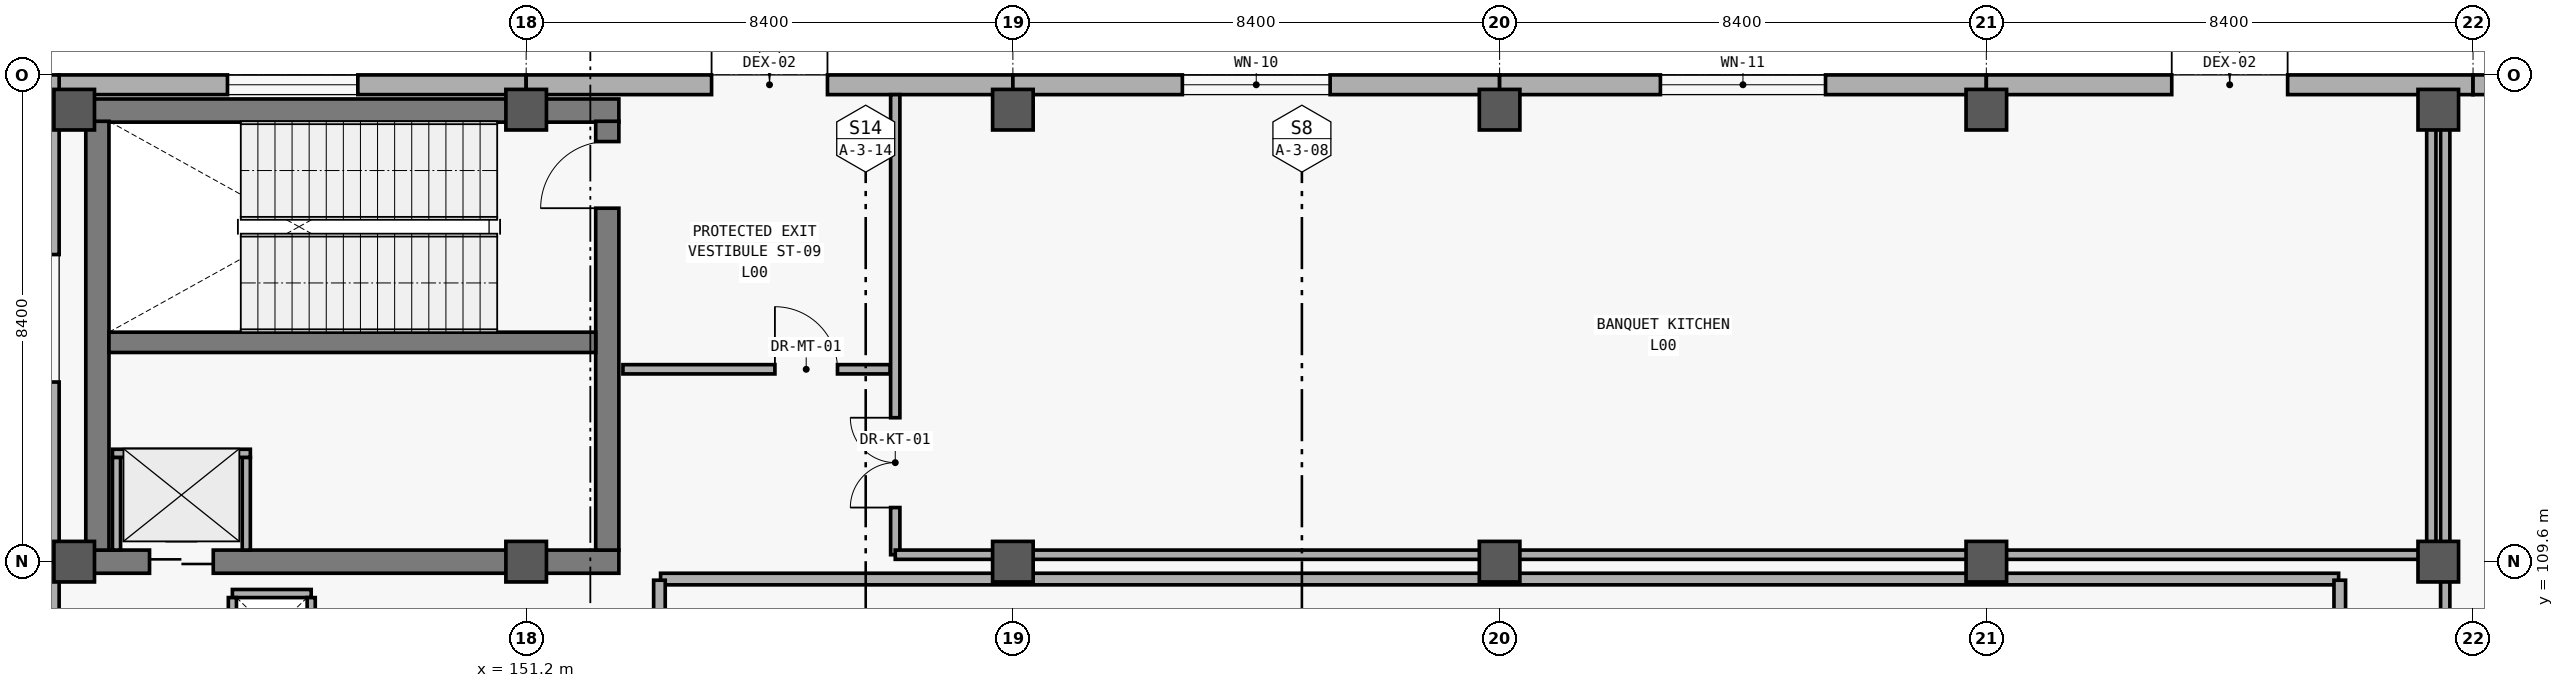
"""IFC4 building model, lengths in metres.
Left out: names, types, materials, properties, quantities, classifications, styles, units other than length and angle.
Written with IfcOpenShell. Run it as: python <this file> out.ifc"""

import sys

from ifc_helpers import new_model, si_unit, direction, frame, frame_2d, origin, origin_2d, place, context, subcontext, project, spatial, rectangle, extrude, element, fill, save


model = new_model("IFC4")
c1 = context("Model", 3, precision=1e-05, world=origin(), true_north=direction((0.0, 1.0)))
c2 = subcontext(c1, "Body", "Model", "MODEL_VIEW")
j1 = project(units=[si_unit("LENGTHUNIT", "METRE"), si_unit("PLANEANGLEUNIT", "RADIAN")], contexts=[c1])
p1 = place(None, origin())
s1 = spatial("IfcSite", under=j1, at=p1, CompositionType="ELEMENT")
p2 = place(p1, origin())
s2 = spatial("IfcBuilding", under=s1, at=p2, CompositionType="ELEMENT")
p3 = place(p2, origin())
s3 = spatial("IfcBuildingStorey", under=s2, at=p3, CompositionType="ELEMENT", Elevation=0.0)
for number, where, z_axis, x_axis in (
    (1, (143.4, 109.6, 0.0), (0.0, 0.0, 1.0), (1.0, 0.0, 0.0)),
    (2, (143.4, 117.4, 0.0), (0.0, 0.0, 1.0), (1.0, 0.0, 0.0)),
    (3, (151.2, 109.6, 0.0), (0.0, 0.0, 1.0), (1.0, 0.0, 0.0)),
    (4, (151.2, 117.4, 0.0), (0.0, 0.0, 1.0), (1.0, 0.0, 0.0)),
    (5, (159.6, 109.6, 0.0), (0.0, 0.0, 1.0), (1.0, 0.0, 0.0)),
    (6, (159.6, 117.4, 0.0), (0.0, 0.0, 1.0), (1.0, 0.0, 0.0)),
    (7, (168.0, 109.6, 0.0), (0.0, 0.0, 1.0), (1.0, 0.0, 0.0)),
    (8, (168.0, 117.4, 0.0), (0.0, 0.0, 1.0), (1.0, 0.0, 0.0)),
    (9, (176.4, 109.6, 0.0), (0.0, 0.0, 1.0), (1.0, 0.0, 0.0)),
    (10, (176.4, 117.4, 0.0), (0.0, 0.0, 1.0), (1.0, 0.0, 0.0)),
    (11, (184.2, 109.6, 0.0), (0.0, 0.0, 1.0), (1.0, 0.0, 0.0)),
    (12, (184.2, 117.4, 0.0), (0.0, 0.0, 1.0), (1.0, 0.0, 0.0)),
):
    element("IfcColumn", number, at=place(p3, frame(where, z_axis=z_axis, x_axis=x_axis)), inside=s3, PredefinedType="COLUMN", context=c2, shape_type="SweptSolid", body=[
        extrude(rectangle(XDim=0.7, YDim=0.7, at=origin_2d()), origin(), (0.0, 0.0, 1.0), 5.4),
    ])
p4 = place(p3, frame((143.14, 117.83, 0.0), z_axis=(0.0, 0.0, 1.0), x_axis=(1.0, 0.0, 0.0)))
e13 = element("IfcWall", 13, at=p4, inside=s3, PredefinedType="SOLIDWALL", context=c2, shape_type="SweptSolid", body=[
    extrude(rectangle(XDim=8.06, YDim=0.34, at=frame_2d((4.03, 0.0))), origin(), (0.0, 0.0, 1.0), 5.08),
])
p5 = place(p4, frame((2.905, 0.0, 0.9)))
e14 = element("IfcOpeningElement", 14, at=p5, cuts=e13, PredefinedType="OPENING", context=c2, shape_type="SweptSolid", body=[
    extrude(rectangle(XDim=2.25, YDim=1.75, at=frame_2d((1.125, 0.875))), frame((0.0, 0.18, 0.0), z_axis=(0.0, -1.0, 0.0), x_axis=(1.0, 0.0, 0.0)), (0.0, 0.0, 1.0), 0.36),
])
p6 = place(p3, frame((151.2, 117.83, 0.0), z_axis=(0.0, 0.0, 1.0), x_axis=(1.0, 0.0, 0.0)))
e15 = element("IfcWall", 15, at=p6, inside=s3, PredefinedType="SOLIDWALL", context=c2, shape_type="SweptSolid", body=[
    extrude(rectangle(XDim=8.4, YDim=0.34, at=frame_2d((4.2, 0.0))), origin(), (0.0, 0.0, 1.0), 5.08),
])
p7 = place(p6, frame((3.2, 0.0, 0.0)))
e16 = element("IfcOpeningElement", 16, at=p7, cuts=e15, PredefinedType="OPENING", context=c2, shape_type="SweptSolid", body=[
    extrude(rectangle(XDim=2.0, YDim=2.6, at=frame_2d((1.0, 1.3))), frame((0.0, 0.18, 0.0), z_axis=(0.0, -1.0, 0.0), x_axis=(1.0, 0.0, 0.0)), (0.0, 0.0, 1.0), 0.36),
])
p8 = place(p3, frame((159.6, 117.83, 0.0), z_axis=(0.0, 0.0, 1.0), x_axis=(1.0, 0.0, 0.0)))
e17 = element("IfcWall", 17, at=p8, inside=s3, PredefinedType="SOLIDWALL", context=c2, shape_type="SweptSolid", body=[
    extrude(rectangle(XDim=8.4, YDim=0.34, at=frame_2d((4.2, 0.0))), origin(), (0.0, 0.0, 1.0), 5.08),
])
p9 = place(p8, frame((2.925, 0.0, 0.9)))
e18 = element("IfcOpeningElement", 18, at=p9, cuts=e17, PredefinedType="OPENING", context=c2, shape_type="SweptSolid", body=[
    extrude(rectangle(XDim=2.55, YDim=1.8, at=frame_2d((1.275, 0.9))), frame((0.0, 0.18, 0.0), z_axis=(0.0, -1.0, 0.0), x_axis=(1.0, 0.0, 0.0)), (0.0, 0.0, 1.0), 0.36),
])
p10 = place(p3, frame((168.0, 117.83, 0.0), z_axis=(0.0, 0.0, 1.0), x_axis=(1.0, 0.0, 0.0)))
e19 = element("IfcWall", 19, at=p10, inside=s3, PredefinedType="SOLIDWALL", context=c2, shape_type="SweptSolid", body=[
    extrude(rectangle(XDim=8.4, YDim=0.34, at=frame_2d((4.2, 0.0))), origin(), (0.0, 0.0, 1.0), 5.08),
])
p11 = place(p10, frame((2.775, 0.0, 0.9)))
e20 = element("IfcOpeningElement", 20, at=p11, cuts=e19, PredefinedType="OPENING", context=c2, shape_type="SweptSolid", body=[
    extrude(rectangle(XDim=2.85, YDim=1.85, at=frame_2d((1.425, 0.925))), frame((0.0, 0.18, 0.0), z_axis=(0.0, -1.0, 0.0), x_axis=(1.0, 0.0, 0.0)), (0.0, 0.0, 1.0), 0.36),
])
p12 = place(p3, frame((176.4, 117.83, 0.0), z_axis=(0.0, 0.0, 1.0), x_axis=(1.0, 0.0, 0.0)))
e21 = element("IfcWall", 21, at=p12, inside=s3, PredefinedType="SOLIDWALL", context=c2, shape_type="SweptSolid", body=[
    extrude(rectangle(XDim=8.4, YDim=0.34, at=frame_2d((4.2, 0.0))), origin(), (0.0, 0.0, 1.0), 5.08),
])
p13 = place(p12, frame((3.2, 0.0, 0.0)))
e22 = element("IfcOpeningElement", 22, at=p13, cuts=e21, PredefinedType="OPENING", context=c2, shape_type="SweptSolid", body=[
    extrude(rectangle(XDim=2.0, YDim=2.6, at=frame_2d((1.0, 1.3))), frame((0.0, 0.18, 0.0), z_axis=(0.0, -1.0, 0.0), x_axis=(1.0, 0.0, 0.0)), (0.0, 0.0, 1.0), 0.36),
])
p14 = place(p3, frame((184.8, 117.83, 0.0), z_axis=(0.0, 0.0, 1.0), x_axis=(1.0, 0.0, 0.0)))
e23 = element("IfcWall", 23, at=p14, inside=s3, PredefinedType="SOLIDWALL", context=c2, shape_type="SweptSolid", body=[
    extrude(rectangle(XDim=8.06, YDim=0.34, at=frame_2d((4.03, 0.0))), origin(), (0.0, 0.0, 1.0), 5.08),
])
p15 = place(p14, frame((2.28, 0.0, 0.9)))
e24 = element("IfcOpeningElement", 24, at=p15, cuts=e23, PredefinedType="OPENING", context=c2, shape_type="SweptSolid", body=[
    extrude(rectangle(XDim=3.5, YDim=2.0, at=frame_2d((1.75, 1.0))), frame((0.0, 0.18, 0.0), z_axis=(0.0, -1.0, 0.0), x_axis=(1.0, 0.0, 0.0)), (0.0, 0.0, 1.0), 0.36),
])
p16 = place(p3, frame((142.97, 101.2, 0.0), z_axis=(0.0, 0.0, 1.0), x_axis=(0.0, 1.0, 0.0)))
e25 = element("IfcWall", 25, at=p16, inside=s3, PredefinedType="SOLIDWALL", context=c2, shape_type="SweptSolid", body=[
    extrude(rectangle(XDim=8.4, YDim=0.34, at=frame_2d((4.2, 0.0))), origin(), (0.0, 0.0, 1.0), 5.08),
])
p17 = place(p16, frame((3.3, 0.0, 0.0)))
e26 = element("IfcOpeningElement", 26, at=p17, cuts=e25, PredefinedType="OPENING", context=c2, shape_type="SweptSolid", body=[
    extrude(rectangle(XDim=1.8, YDim=2.4, at=frame_2d((0.9, 1.2))), frame((0.0, 0.18, 0.0), z_axis=(0.0, -1.0, 0.0), x_axis=(1.0, 0.0, 0.0)), (0.0, 0.0, 1.0), 0.36),
])
p18 = place(p3, frame((142.97, 109.6, 0.0), z_axis=(0.0, 0.0, 1.0), x_axis=(0.0, 1.0, 0.0)))
e27 = element("IfcWall", 27, at=p18, inside=s3, PredefinedType="SOLIDWALL", context=c2, shape_type="SweptSolid", body=[
    extrude(rectangle(XDim=8.4, YDim=0.34, at=frame_2d((4.2, 0.0))), origin(), (0.0, 0.0, 1.0), 5.08),
])
p19 = place(p18, frame((3.1, 0.0, 0.9)))
e28 = element("IfcOpeningElement", 28, at=p19, cuts=e27, PredefinedType="OPENING", context=c2, shape_type="SweptSolid", body=[
    extrude(rectangle(XDim=2.2, YDim=1.65, at=frame_2d((1.1, 0.825))), frame((0.0, 0.18, 0.0), z_axis=(0.0, -1.0, 0.0), x_axis=(1.0, 0.0, 0.0)), (0.0, 0.0, 1.0), 0.36),
])
p20 = place(p3, frame((143.6, 109.6, 0.0), z_axis=(0.0, 0.0, 1.0), x_axis=(1.0, 0.0, 0.0)))
e29 = element("IfcWall", 29, at=p20, inside=s3, PredefinedType="SHEAR", context=c2, shape_type="SweptSolid", body=[
    extrude(rectangle(XDim=9.2, YDim=0.4, at=frame_2d((4.6, 0.0))), origin(), (0.0, 0.0, 1.0), 5.08),
])
p21 = place(p20, frame((1.1, 0.0, 0.0)))
e30 = element("IfcOpeningElement", 30, at=p21, cuts=e29, PredefinedType="OPENING", context=c2, shape_type="SweptSolid", body=[
    extrude(rectangle(XDim=1.1, YDim=2.2, at=frame_2d((0.55, 1.1))), frame((0.0, 0.21, 0.0), z_axis=(0.0, -1.0, 0.0), x_axis=(1.0, 0.0, 0.0)), (0.0, 0.0, 1.0), 0.42),
])
p22 = place(p3, frame((152.8, 117.385, 0.0), z_axis=(0.0, 0.0, 1.0), x_axis=(-1.0, 0.0, 0.0)))
e31 = element("IfcWall", 31, at=p22, inside=s3, PredefinedType="SHEAR", context=c2, shape_type="SweptSolid", body=[
    extrude(rectangle(XDim=9.2, YDim=0.4, at=frame_2d((4.6, 0.0))), origin(), (0.0, 0.0, 1.0), 5.08),
])
p23 = place(p3, frame((143.8, 117.2, 0.0), z_axis=(0.0, 0.0, 1.0), x_axis=(0.0, -1.0, 0.0)))
e32 = element("IfcWall", 32, at=p23, inside=s3, PredefinedType="SHEAR", context=c2, shape_type="SweptSolid", body=[
    extrude(rectangle(XDim=7.4, YDim=0.4, at=frame_2d((3.7, 0.0))), origin(), (0.0, 0.0, 1.0), 5.08),
])
p24 = place(p3, frame((152.6, 109.8, 0.0), z_axis=(0.0, 0.0, 1.0), x_axis=(0.0, 1.0, 0.0)))
e33 = element("IfcWall", 33, at=p24, inside=s3, PredefinedType="SHEAR", context=c2, shape_type="SweptSolid", body=[
    extrude(rectangle(XDim=7.4, YDim=0.4, at=frame_2d((3.7, 0.0))), origin(), (0.0, 0.0, 1.0), 5.08),
])
p25 = place(p24, frame((5.9, 0.0, 0.0)))
e34 = element("IfcOpeningElement", 34, at=p25, cuts=e33, PredefinedType="OPENING", context=c2, shape_type="SweptSolid", body=[
    extrude(rectangle(XDim=1.15, YDim=2.2, at=frame_2d((0.575, 1.1))), frame((0.0, 0.21, 0.0), z_axis=(0.0, -1.0, 0.0), x_axis=(1.0, 0.0, 0.0)), (0.0, 0.0, 1.0), 0.42),
])
p26 = place(p3, frame((144.0, 113.385, 0.0), z_axis=(0.0, 0.0, 1.0), x_axis=(1.0, 0.0, 0.0)))
e35 = element("IfcWall", 35, at=p26, inside=s3, PredefinedType="SHEAR", context=c2, shape_type="SweptSolid", body=[
    extrude(rectangle(XDim=8.4, YDim=0.35, at=frame_2d((4.2, 0.0))), origin(), (0.0, 0.0, 1.0), 5.08),
])
for number, where, z_axis, x_axis in (
    (36, (144.13, 109.8, 0.0), (0.0, 0.0, 1.0), (0.0, 1.0, 0.0)),
    (37, (146.37, 109.8, 0.0), (0.0, 0.0, 1.0), (0.0, 1.0, 0.0)),
):
    element("IfcWall", number, at=place(p3, frame(where, z_axis=z_axis, x_axis=x_axis)), inside=s3, PredefinedType="PARTITIONING", context=c2, shape_type="SweptSolid", body=[
        extrude(rectangle(XDim=1.6, YDim=0.14, at=frame_2d((0.8, 0.0))), origin(), (0.0, 0.0, 1.0), 4.23),
    ])
p27 = place(p3, frame((144.06, 111.47, 0.0), z_axis=(0.0, 0.0, 1.0), x_axis=(1.0, 0.0, 0.0)))
e38 = element("IfcWall", 38, at=p27, inside=s3, PredefinedType="PARTITIONING", context=c2, shape_type="SweptSolid", body=[
    extrude(rectangle(XDim=2.38, YDim=0.14, at=frame_2d((1.19, 0.0))), origin(), (0.0, 0.0, 1.0), 4.23),
])
p28 = place(p3, frame((152.87, 112.92, 0.0), z_axis=(0.0, 0.0, 1.0), x_axis=(1.0, 0.0, 0.0)))
e39 = element("IfcWall", 39, at=p28, inside=s3, PredefinedType="PARTITIONING", context=c2, shape_type="SweptSolid", body=[
    extrude(rectangle(XDim=4.61, YDim=0.16, at=frame_2d((2.305, 0.0))), origin(), (0.0, 0.0, 1.0), 4.18),
])
p29 = place(p28, frame((2.623, 0.0, 0.0)))
e40 = element("IfcOpeningElement", 40, at=p29, cuts=e39, PredefinedType="OPENING", context=c2, shape_type="SweptSolid", body=[
    extrude(rectangle(XDim=1.08, YDim=2.25, at=frame_2d((0.54, 1.125))), frame((0.0, 0.09, 0.0), z_axis=(0.0, -1.0, 0.0), x_axis=(1.0, 0.0, 0.0)), (0.0, 0.0, 1.0), 0.18),
])
p30 = place(p3, frame((157.57, 109.72, 0.0), z_axis=(0.0, 0.0, 1.0), x_axis=(0.0, 1.0, 0.0)))
e41 = element("IfcWall", 41, at=p30, inside=s3, PredefinedType="PARTITIONING", context=c2, shape_type="SweptSolid", body=[
    extrude(rectangle(XDim=7.94, YDim=0.16, at=frame_2d((3.97, 0.0))), origin(), (0.0, 0.0, 1.0), 4.18),
])
p31 = place(p30, frame((0.814, 0.0, 0.0)))
e42 = element("IfcOpeningElement", 42, at=p31, cuts=e41, PredefinedType="OPENING", context=c2, shape_type="SweptSolid", body=[
    extrude(rectangle(XDim=1.55, YDim=2.25, at=frame_2d((0.775, 1.125))), frame((0.0, 0.09, 0.0), z_axis=(0.0, -1.0, 0.0), x_axis=(1.0, 0.0, 0.0)), (0.0, 0.0, 1.0), 0.18),
])
p32 = place(p3, frame((184.32, 92.92, 0.0), z_axis=(0.0, 0.0, 1.0), x_axis=(0.0, 1.0, 0.0)))
e43 = element("IfcWall", 43, at=p32, inside=s3, PredefinedType="PARTITIONING", context=c2, shape_type="SweptSolid", body=[
    extrude(rectangle(XDim=24.74, YDim=0.16, at=frame_2d((12.37, 0.0))), origin(), (0.0, 0.0, 1.0), 4.18),
])
p33 = place(p32, frame((3.487, 0.0, 0.0)))
e44 = element("IfcOpeningElement", 44, at=p33, cuts=e43, PredefinedType="OPENING", context=c2, shape_type="SweptSolid", body=[
    extrude(rectangle(XDim=1.06, YDim=2.2, at=frame_2d((0.53, 1.1))), frame((0.0, 0.09, 0.0), z_axis=(0.0, -1.0, 0.0), x_axis=(1.0, 0.0, 0.0)), (0.0, 0.0, 1.0), 0.18),
])
p34 = place(p3, frame((153.52, 109.3, 0.0), z_axis=(0.0, 0.0, 1.0), x_axis=(1.0, 0.0, 0.0)))
e45 = element("IfcWall", 45, at=p34, inside=s3, PredefinedType="SOLIDWALL", context=c2, shape_type="SweptSolid", body=[
    extrude(rectangle(XDim=28.96, YDim=0.2, at=frame_2d((14.48, 0.0))), origin(), (0.0, 0.0, 1.0), 4.18),
])
for number, where, z_axis, x_axis in (
    (46, (153.5, 92.92, 0.0), (0.0, 0.0, 1.0), (0.0, 1.0, 0.0)),
    (47, (182.5, 92.92, 0.0), (0.0, 0.0, 1.0), (0.0, 1.0, 0.0)),
):
    element("IfcWall", number, at=place(p3, frame(where, z_axis=z_axis, x_axis=x_axis)), inside=s3, PredefinedType="SOLIDWALL", context=c2, shape_type="SweptSolid", body=[
        extrude(rectangle(XDim=16.36, YDim=0.2, at=frame_2d((8.18, 0.0))), origin(), (0.0, 0.0, 1.0), 4.18),
    ])
p35 = place(p3, frame((157.57, 109.72, 0.0), z_axis=(0.0, 0.0, 1.0), x_axis=(1.0, 0.0, 0.0)))
e48 = element("IfcWall", 48, at=p35, inside=s3, PredefinedType="PARTITIONING", context=c2, shape_type="SweptSolid", body=[
    extrude(rectangle(XDim=26.51, YDim=0.16, at=frame_2d((13.255, 0.0))), origin(), (0.0, 0.0, 1.0), 4.18),
])
p36 = place(p3, frame((184.08, 109.72, 0.0), z_axis=(0.0, 0.0, 1.0), x_axis=(0.0, 1.0, 0.0)))
e49 = element("IfcWall", 49, at=p36, inside=s3, PredefinedType="PARTITIONING", context=c2, shape_type="SweptSolid", body=[
    extrude(rectangle(XDim=7.94, YDim=0.16, at=frame_2d((3.97, 0.0))), origin(), (0.0, 0.0, 1.0), 4.18),
])
p37 = place(p3, frame((147.49, 109.05, 0.0), z_axis=(0.0, 0.0, 1.0), x_axis=(-1.0, 0.0, 0.0)))
e50 = element("IfcWall", 50, at=p37, inside=s3, PredefinedType="PARTITIONING", context=c2, shape_type="SweptSolid", body=[
    extrude(rectangle(XDim=1.36, YDim=0.14, at=frame_2d((0.68, 0.0))), origin(), (0.0, 0.0, 1.0), 4.2),
])
for number, where, z_axis, x_axis in (
    (51, (146.13, 108.98, 0.0), (0.0, 0.0, 1.0), (0.0, -1.0, 0.0)),
    (52, (147.49, 107.8, 0.0), (0.0, 0.0, 1.0), (0.0, 1.0, 0.0)),
):
    element("IfcWall", number, at=place(p3, frame(where, z_axis=z_axis, x_axis=x_axis)), inside=s3, PredefinedType="PARTITIONING", context=c2, shape_type="SweptSolid", body=[
        extrude(rectangle(XDim=1.18, YDim=0.14, at=frame_2d((0.59, 0.0))), origin(), (0.0, 0.0, 1.0), 4.2),
    ])
p38 = place(p5, origin())
e53 = element("IfcWindow", 53, at=p38, inside=s3, PartitioningType="SINGLE_PANEL", PredefinedType="WINDOW", context=c2, shape_type="SweptSolid", body=[
    extrude(rectangle(XDim=2.25, YDim=1.75, at=frame_2d((1.125, 0.875))), frame((0.0, 0.03, 0.0), z_axis=(0.0, -1.0, 0.0), x_axis=(1.0, 0.0, 0.0)), (0.0, 0.0, 1.0), 0.06),
])
fill(e14, e53)
p39 = place(p7, origin())
e54 = element("IfcDoor", 54, at=p39, inside=s3, OperationType="DOUBLE_DOOR_SINGLE_SWING", PredefinedType="DOOR", context=c2, shape_type="SweptSolid", body=[
    extrude(rectangle(XDim=2.0, YDim=2.6, at=frame_2d((1.0, 1.3))), frame((0.0, 0.025, 0.0), z_axis=(0.0, -1.0, 0.0), x_axis=(1.0, 0.0, 0.0)), (0.0, 0.0, 1.0), 0.05),
])
fill(e16, e54)
p40 = place(p9, origin())
e55 = element("IfcWindow", 55, at=p40, inside=s3, PartitioningType="SINGLE_PANEL", PredefinedType="WINDOW", context=c2, shape_type="SweptSolid", body=[
    extrude(rectangle(XDim=2.55, YDim=1.8, at=frame_2d((1.275, 0.9))), frame((0.0, 0.03, 0.0), z_axis=(0.0, -1.0, 0.0), x_axis=(1.0, 0.0, 0.0)), (0.0, 0.0, 1.0), 0.06),
])
fill(e18, e55)
p41 = place(p11, origin())
e56 = element("IfcWindow", 56, at=p41, inside=s3, PartitioningType="SINGLE_PANEL", PredefinedType="WINDOW", context=c2, shape_type="SweptSolid", body=[
    extrude(rectangle(XDim=2.85, YDim=1.85, at=frame_2d((1.425, 0.925))), frame((0.0, 0.03, 0.0), z_axis=(0.0, -1.0, 0.0), x_axis=(1.0, 0.0, 0.0)), (0.0, 0.0, 1.0), 0.06),
])
fill(e20, e56)
p42 = place(p13, origin())
e57 = element("IfcDoor", 57, at=p42, inside=s3, OperationType="DOUBLE_DOOR_SINGLE_SWING", PredefinedType="DOOR", context=c2, shape_type="SweptSolid", body=[
    extrude(rectangle(XDim=2.0, YDim=2.6, at=frame_2d((1.0, 1.3))), frame((0.0, 0.025, 0.0), z_axis=(0.0, -1.0, 0.0), x_axis=(1.0, 0.0, 0.0)), (0.0, 0.0, 1.0), 0.05),
])
fill(e22, e57)
p43 = place(p25, origin())
e58 = element("IfcDoor", 58, at=p43, inside=s3, OperationType="SINGLE_SWING_LEFT", PredefinedType="DOOR", context=c2, shape_type="SweptSolid", body=[
    extrude(rectangle(XDim=1.15, YDim=2.2, at=frame_2d((0.575, 1.1))), frame((0.0, 0.025, 0.0), z_axis=(0.0, -1.0, 0.0), x_axis=(1.0, 0.0, 0.0)), (0.0, 0.0, 1.0), 0.05),
])
fill(e34, e58)
p44 = place(p21, origin())
e59 = element("IfcDoor", 59, at=p44, inside=s3, OperationType="DOUBLE_DOOR_SLIDING", PredefinedType="DOOR", context=c2, shape_type="SweptSolid", body=[
    extrude(rectangle(XDim=1.1, YDim=2.2, at=frame_2d((0.55, 1.1))), frame((0.0, 0.025, 0.0), z_axis=(0.0, -1.0, 0.0), x_axis=(1.0, 0.0, 0.0)), (0.0, 0.0, 1.0), 0.05),
])
fill(e30, e59)
p45 = place(p29, origin())
e60 = element("IfcDoor", 60, at=p45, inside=s3, OperationType="SINGLE_SWING_LEFT", PredefinedType="DOOR", context=c2, shape_type="SweptSolid", body=[
    extrude(rectangle(XDim=1.08, YDim=2.25, at=frame_2d((0.54, 1.125))), frame((0.0, 0.025, 0.0), z_axis=(0.0, -1.0, 0.0), x_axis=(1.0, 0.0, 0.0)), (0.0, 0.0, 1.0), 0.05),
])
fill(e40, e60)
p46 = place(p31, origin())
e61 = element("IfcDoor", 61, at=p46, inside=s3, OperationType="DOUBLE_DOOR_DOUBLE_SWING", PredefinedType="DOOR", context=c2, shape_type="SweptSolid", body=[
    extrude(rectangle(XDim=1.55, YDim=2.25, at=frame_2d((0.775, 1.125))), frame((0.0, 0.025, 0.0), z_axis=(0.0, -1.0, 0.0), x_axis=(1.0, 0.0, 0.0)), (0.0, 0.0, 1.0), 0.05),
])
fill(e42, e61)
save(model, sys.argv[1])
